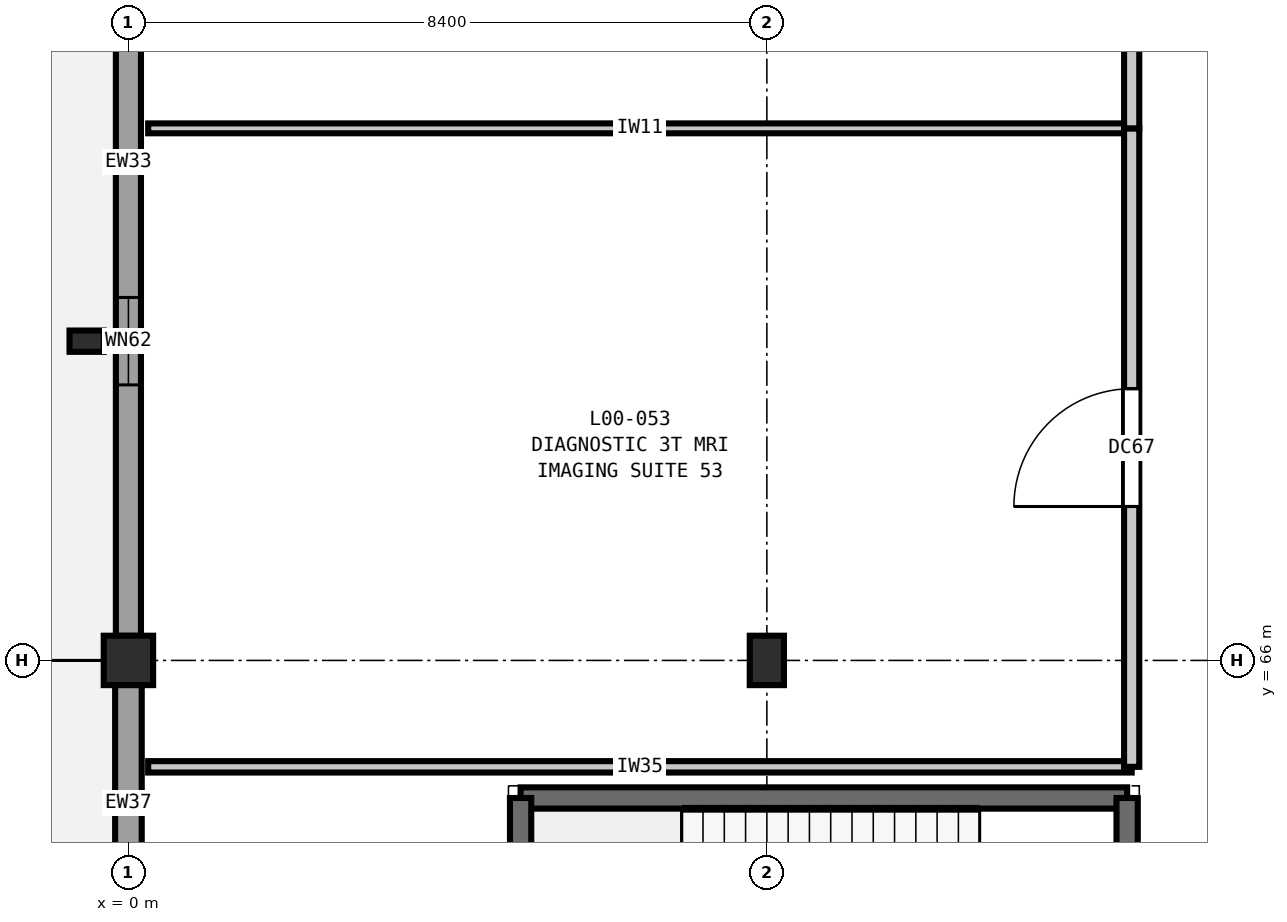
"""IFC4 building model, lengths in metres.
Left out: names, types, materials, properties, quantities, classifications, styles, units other than length and angle.
Written with IfcOpenShell. Run it as: python <this file> out.ifc"""

import sys

from ifc_helpers import new_model, si_unit, direction, frame, frame_2d, origin, origin_2d, place, context, subcontext, project, spatial, rectangle, extrude, element, fill, save


model = new_model("IFC4")
c1 = context("Model", 3, precision=1e-05, world=origin(), true_north=direction((0.0, 1.0)))
c2 = subcontext(c1, "Body", "Model", "MODEL_VIEW")
j1 = project(units=[si_unit("LENGTHUNIT", "METRE"), si_unit("PLANEANGLEUNIT", "RADIAN")], contexts=[c1])
p1 = place(None, origin())
s1 = spatial("IfcSite", under=j1, at=p1, CompositionType="ELEMENT")
p2 = place(p1, origin())
s2 = spatial("IfcBuilding", under=s1, at=p2, CompositionType="ELEMENT")
p3 = place(p2, origin())
s3 = spatial("IfcBuildingStorey", under=s2, at=p3, CompositionType="ELEMENT", Elevation=0.0)
p4 = place(p3, frame((0.0, 66.0, 0.0), z_axis=(0.0, 0.0, 1.0), x_axis=(1.0, 0.0, 0.0)))
e1 = element("IfcColumn", 1, at=p4, inside=s3, PredefinedType="COLUMN", context=c2, shape_type="SweptSolid", body=[
    extrude(rectangle(XDim=0.65, YDim=0.65, at=origin_2d()), origin(), (0.0, 0.0, 1.0), 5.4),
])
p5 = place(p3, frame((8.4, 66.0, 0.0), z_axis=(0.0, 0.0, 1.0), x_axis=(1.0, 0.0, 0.0)))
e2 = element("IfcColumn", 2, at=p5, inside=s3, PredefinedType="COLUMN", context=c2, shape_type="SweptSolid", body=[
    extrude(rectangle(XDim=0.45, YDim=0.65, at=origin_2d()), origin(), (0.0, 0.0, 1.0), 5.4),
])
p6 = place(p3, frame((-0.55, 70.2, 0.0), z_axis=(0.0, 0.0, 1.0), x_axis=(1.0, 0.0, 0.0)))
e3 = element("IfcColumn", 3, at=p6, inside=s3, PredefinedType="PILASTER", context=c2, shape_type="SweptSolid", body=[
    extrude(rectangle(XDim=0.45, YDim=0.28, at=origin_2d()), origin(), (0.0, 0.0, 1.0), 5.4),
])
p7 = place(p3, frame((0.0, 57.923, 0.0), z_axis=(0.0, 0.0, 1.0), x_axis=(0.0, 1.0, 0.0)))
e4 = element("IfcWall", 4, at=p7, inside=s3, PredefinedType="SOLIDWALL", context=c2, shape_type="SweptSolid", body=[
    extrude(rectangle(XDim=7.754, YDim=0.35, at=frame_2d((3.877, 0.0))), origin(), (0.0, 0.0, 1.0), 4.68),
])
p8 = place(p7, frame((3.352, 0.0, 0.9)))
e5 = element("IfcOpeningElement", 5, at=p8, cuts=e4, PredefinedType="OPENING", context=c2, shape_type="SweptSolid", body=[
    extrude(rectangle(XDim=1.05, YDim=1.4, at=frame_2d((0.525, 0.7))), frame((0.0, 0.185, 0.0), z_axis=(0.0, -1.0, 0.0), x_axis=(1.0, 0.0, 0.0)), (0.0, 0.0, 1.0), 0.37),
])
p9 = place(p3, frame((0.0, 66.323, 0.0), z_axis=(0.0, 0.0, 1.0), x_axis=(0.0, 1.0, 0.0)))
e6 = element("IfcWall", 6, at=p9, inside=s3, PredefinedType="SOLIDWALL", context=c2, shape_type="SweptSolid", body=[
    extrude(rectangle(XDim=7.754, YDim=0.33, at=frame_2d((3.877, 0.0))), origin(), (0.0, 0.0, 1.0), 4.68),
])
p10 = place(p9, frame((3.302, 0.0, 0.9)))
e7 = element("IfcOpeningElement", 7, at=p10, cuts=e6, PredefinedType="OPENING", context=c2, shape_type="SweptSolid", body=[
    extrude(rectangle(XDim=1.15, YDim=1.4, at=frame_2d((0.575, 0.7))), frame((0.0, 0.175, 0.0), z_axis=(0.0, -1.0, 0.0), x_axis=(1.0, 0.0, 0.0)), (0.0, 0.0, 1.0), 0.35),
])
p11 = place(p3, frame((13.14, 64.19, 0.0), z_axis=(0.0, 0.0, 1.0), x_axis=(-1.0, 0.0, 0.0)))
e8 = element("IfcWall", 8, at=p11, inside=s3, PredefinedType="SHEAR", context=c2, shape_type="SweptSolid", body=[
    extrude(rectangle(XDim=7.98, YDim=0.28, at=frame_2d((3.99, 0.0))), origin(), (0.0, 0.0, 1.0), 5.4),
])
p12 = place(p3, frame((5.16, 64.19, 0.0), z_axis=(0.0, 0.0, 1.0), x_axis=(0.0, -1.0, 0.0)))
e9 = element("IfcWall", 9, at=p12, inside=s3, PredefinedType="SHEAR", context=c2, shape_type="SweptSolid", body=[
    extrude(rectangle(XDim=4.08, YDim=0.28, at=frame_2d((2.04, 0.0))), origin(), (0.0, 0.0, 1.0), 5.4),
])
p13 = place(p3, frame((13.14, 60.11, 0.0), z_axis=(0.0, 0.0, 1.0), x_axis=(0.0, 1.0, 0.0)))
e10 = element("IfcWall", 10, at=p13, inside=s3, PredefinedType="SHEAR", context=c2, shape_type="SweptSolid", body=[
    extrude(rectangle(XDim=4.08, YDim=0.28, at=frame_2d((2.04, 0.0))), origin(), (0.0, 0.0, 1.0), 5.4),
])
p14 = place(p13, frame((1.29, 0.0, 0.0)))
e11 = element("IfcOpeningElement", 11, at=p14, cuts=e10, PredefinedType="OPENING", context=c2, shape_type="SweptSolid", body=[
    extrude(rectangle(XDim=1.5, YDim=2.2, at=frame_2d((0.75, 1.1))), frame((0.0, 0.15, 0.0), z_axis=(0.0, -1.0, 0.0), x_axis=(1.0, 0.0, 0.0)), (0.0, 0.0, 1.0), 0.3),
])
p15 = place(p3, frame((0.26, 64.6, 0.0), z_axis=(0.0, 0.0, 1.0), x_axis=(1.0, 0.0, 0.0)))
e12 = element("IfcWall", 12, at=p15, inside=s3, PredefinedType="PARTITIONING", context=c2, shape_type="SweptSolid", body=[
    extrude(rectangle(XDim=12.94, YDim=0.15, at=frame_2d((6.47, 0.0))), origin(), (0.0, 0.0, 1.0), 5.04),
])
p16 = place(p3, frame((0.26, 73.0, 0.0), z_axis=(0.0, 0.0, 1.0), x_axis=(1.0, 0.0, 0.0)))
e13 = element("IfcWall", 13, at=p16, inside=s3, PredefinedType="PARTITIONING", context=c2, shape_type="SweptSolid", body=[
    extrude(rectangle(XDim=12.94, YDim=0.13, at=frame_2d((6.47, 0.0))), origin(), (0.0, 0.0, 1.0), 5.04),
])
p17 = place(p3, frame((13.2, 64.6, 0.0), z_axis=(0.0, 0.0, 1.0), x_axis=(0.0, 1.0, 0.0)))
e14 = element("IfcWall", 14, at=p17, inside=s3, PredefinedType="PARTITIONING", context=c2, shape_type="SweptSolid", body=[
    extrude(rectangle(XDim=8.4, YDim=0.2, at=frame_2d((4.2, 0.0))), origin(), (0.0, 0.0, 1.0), 5.04),
])
p18 = place(p17, frame((3.425, 0.0, 0.0)))
e15 = element("IfcOpeningElement", 15, at=p18, cuts=e14, PredefinedType="OPENING", context=c2, shape_type="SweptSolid", body=[
    extrude(rectangle(XDim=1.55, YDim=2.25, at=frame_2d((0.775, 1.125))), frame((0.0, 0.11, 0.0), z_axis=(0.0, -1.0, 0.0), x_axis=(1.0, 0.0, 0.0)), (0.0, 0.0, 1.0), 0.22),
])
p19 = place(p3, frame((13.2, 73.0, 0.0), z_axis=(0.0, 0.0, 1.0), x_axis=(0.0, 1.0, 0.0)))
e16 = element("IfcWall", 16, at=p19, inside=s3, PredefinedType="PARTITIONING", context=c2, shape_type="SweptSolid", body=[
    extrude(rectangle(XDim=9.8, YDim=0.2, at=frame_2d((4.9, 0.0))), origin(), (0.0, 0.0, 1.0), 5.04),
])
p20 = place(p19, frame((4.05, 0.0, 0.0)))
e17 = element("IfcOpeningElement", 17, at=p20, cuts=e16, PredefinedType="OPENING", context=c2, shape_type="SweptSolid", body=[
    extrude(rectangle(XDim=1.7, YDim=2.3, at=frame_2d((0.85, 1.15))), frame((0.0, 0.11, 0.0), z_axis=(0.0, -1.0, 0.0), x_axis=(1.0, 0.0, 0.0)), (0.0, 0.0, 1.0), 0.22),
])
p21 = place(p10, origin())
e18 = element("IfcWindow", 18, at=p21, inside=s3, PartitioningType="SINGLE_PANEL", PredefinedType="WINDOW", context=c2, shape_type="SweptSolid", body=[
    extrude(rectangle(XDim=1.15, YDim=1.4, at=frame_2d((0.575, 0.7))), frame((0.0, 0.03, 0.0), z_axis=(0.0, -1.0, 0.0), x_axis=(1.0, 0.0, 0.0)), (0.0, 0.0, 1.0), 0.06),
])
fill(e7, e18)
p22 = place(p18, origin())
e19 = element("IfcDoor", 19, at=p22, inside=s3, OperationType="SINGLE_SWING_LEFT", PredefinedType="DOOR", context=c2, shape_type="SweptSolid", body=[
    extrude(rectangle(XDim=1.55, YDim=2.25, at=frame_2d((0.775, 1.125))), frame((0.0, 0.025, 0.0), z_axis=(0.0, -1.0, 0.0), x_axis=(1.0, 0.0, 0.0)), (0.0, 0.0, 1.0), 0.05),
])
fill(e15, e19)
save(model, sys.argv[1])
